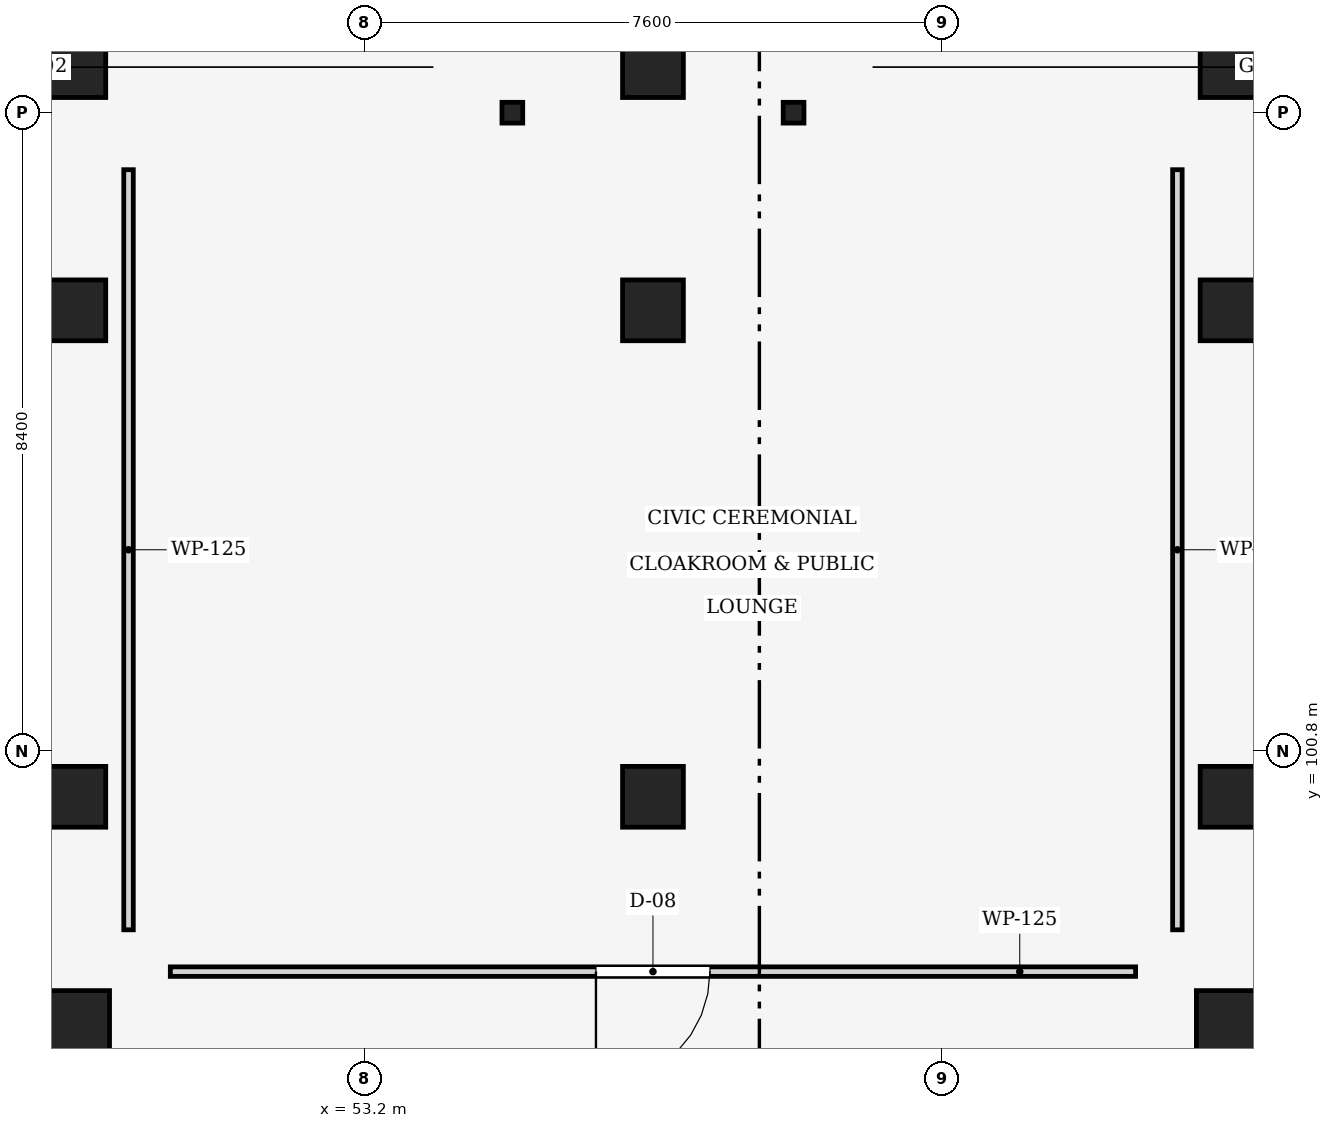
"""IFC4 building model, lengths in metres.
Left out: names, types, materials, properties, quantities, classifications, styles, units other than length and angle.
Written with IfcOpenShell. Run it as: python <this file> out.ifc"""

import sys

from ifc_helpers import new_model, si_unit, direction, frame, frame_2d, origin, origin_2d, place, context, subcontext, project, spatial, rectangle, hollow_circle, extrude, element, fill, save


model = new_model("IFC4")
c1 = context("Model", 3, precision=1e-05, world=origin(), true_north=direction((0.0, 1.0)))
c2 = subcontext(c1, "Body", "Model", "MODEL_VIEW")
j1 = project(units=[si_unit("LENGTHUNIT", "METRE"), si_unit("PLANEANGLEUNIT", "RADIAN")], contexts=[c1])
p1 = place(None, origin())
s1 = spatial("IfcSite", under=j1, at=p1, CompositionType="ELEMENT")
p2 = place(p1, origin())
s2 = spatial("IfcBuilding", under=s1, at=p2, CompositionType="ELEMENT")
p3 = place(p2, origin())
s3 = spatial("IfcBuildingStorey", under=s2, at=p3, CompositionType="ELEMENT", Elevation=0.0)
for number, where, z_axis, x_axis in (
    (1, (49.4, 97.2, 0.0), (0.0, 0.0, 1.0), (1.0, 0.0, 0.0)),
    (2, (64.6, 97.2, 0.0), (0.0, 0.0, 1.0), (1.0, 0.0, 0.0)),
):
    element("IfcColumn", number, at=place(p3, frame(where, z_axis=z_axis, x_axis=x_axis)), inside=s3, PredefinedType="COLUMN", context=c2, shape_type="SweptSolid", body=[
        extrude(rectangle(XDim=0.9, YDim=0.9, at=origin_2d()), origin(), (0.0, 0.0, 1.0), 5.1),
    ])
for number, where, z_axis, x_axis in (
    (3, (49.4, 100.2, 0.0), (0.0, 0.0, 1.0), (1.0, 0.0, 0.0)),
    (4, (57.0, 100.2, 0.0), (0.0, 0.0, 1.0), (1.0, 0.0, 0.0)),
    (5, (64.6, 100.2, 0.0), (0.0, 0.0, 1.0), (1.0, 0.0, 0.0)),
    (6, (49.4, 106.6, 0.0), (0.0, 0.0, 1.0), (1.0, 0.0, 0.0)),
    (7, (57.0, 106.6, 0.0), (0.0, 0.0, 1.0), (1.0, 0.0, 0.0)),
    (8, (64.6, 106.6, 0.0), (0.0, 0.0, 1.0), (1.0, 0.0, 0.0)),
    (9, (49.4, 109.8, 0.0), (0.0, 0.0, 1.0), (1.0, 0.0, 0.0)),
    (10, (57.0, 109.8, 0.0), (0.0, 0.0, 1.0), (1.0, 0.0, 0.0)),
    (11, (64.6, 109.8, 0.0), (0.0, 0.0, 1.0), (1.0, 0.0, 0.0)),
):
    element("IfcColumn", number, at=place(p3, frame(where, z_axis=z_axis, x_axis=x_axis)), inside=s3, PredefinedType="COLUMN", context=c2, shape_type="SweptSolid", body=[
        extrude(rectangle(XDim=0.8, YDim=0.8, at=origin_2d()), origin(), (0.0, 0.0, 1.0), 5.1),
    ])
for number, where, z_axis, x_axis in (
    (12, (55.15, 109.2, 0.0), (0.0, 0.0, 1.0), (1.0, 0.0, 0.0)),
    (13, (58.85, 109.2, 0.0), (0.0, 0.0, 1.0), (1.0, 0.0, 0.0)),
):
    element("IfcColumn", number, at=place(p3, frame(where, z_axis=z_axis, x_axis=x_axis)), inside=s3, PredefinedType="COLUMN", context=c2, shape_type="SweptSolid", body=[
        extrude(hollow_circle(Radius=0.136, WallThickness=0.016, at=origin_2d()), origin(), (0.0, 0.0, 1.0), 5.1),
    ])
p4 = place(p3, frame((63.35, 97.9, 0.0), z_axis=(0.0, 0.0, 1.0), x_axis=(-1.0, 0.0, 0.0)))
e14 = element("IfcWall", 14, at=p4, inside=s3, PredefinedType="PARTITIONING", context=c2, shape_type="SweptSolid", body=[
    extrude(rectangle(XDim=12.7, YDim=0.125, at=frame_2d((6.35, 0.0))), origin(), (0.0, 0.0, 1.0), 4.73),
])
p5 = place(p4, frame((5.6, 0.0, 0.0)))
e15 = element("IfcOpeningElement", 15, at=p5, cuts=e14, PredefinedType="OPENING", context=c2, shape_type="SweptSolid", body=[
    extrude(rectangle(XDim=1.5, YDim=2.1, at=frame_2d((0.75, 1.05))), frame((0.0, 0.073, 0.0), z_axis=(0.0, -1.0, 0.0), x_axis=(1.0, 0.0, 0.0)), (0.0, 0.0, 1.0), 0.145),
])
for number, where, z_axis, x_axis in (
    (16, (63.9, 108.45, 0.0), (0.0, 0.0, 1.0), (0.0, -1.0, 0.0)),
    (17, (50.1, 98.45, 0.0), (0.0, 0.0, 1.0), (0.0, 1.0, 0.0)),
):
    element("IfcWall", number, at=place(p3, frame(where, z_axis=z_axis, x_axis=x_axis)), inside=s3, PredefinedType="PARTITIONING", context=c2, shape_type="SweptSolid", body=[
        extrude(rectangle(XDim=10.0, YDim=0.125, at=frame_2d((5.0, 0.0))), origin(), (0.0, 0.0, 1.0), 4.195),
    ])
p6 = place(p5, origin())
e18 = element("IfcDoor", 18, at=p6, inside=s3, OperationType="SINGLE_SWING_RIGHT", PredefinedType="DOOR", context=c2, shape_type="SweptSolid", body=[
    extrude(rectangle(XDim=1.5, YDim=2.1, at=frame_2d((0.75, 1.05))), frame((0.0, 0.025, 0.0), z_axis=(0.0, -1.0, 0.0), x_axis=(1.0, 0.0, 0.0)), (0.0, 0.0, 1.0), 0.05),
])
fill(e15, e18)
save(model, sys.argv[1])
